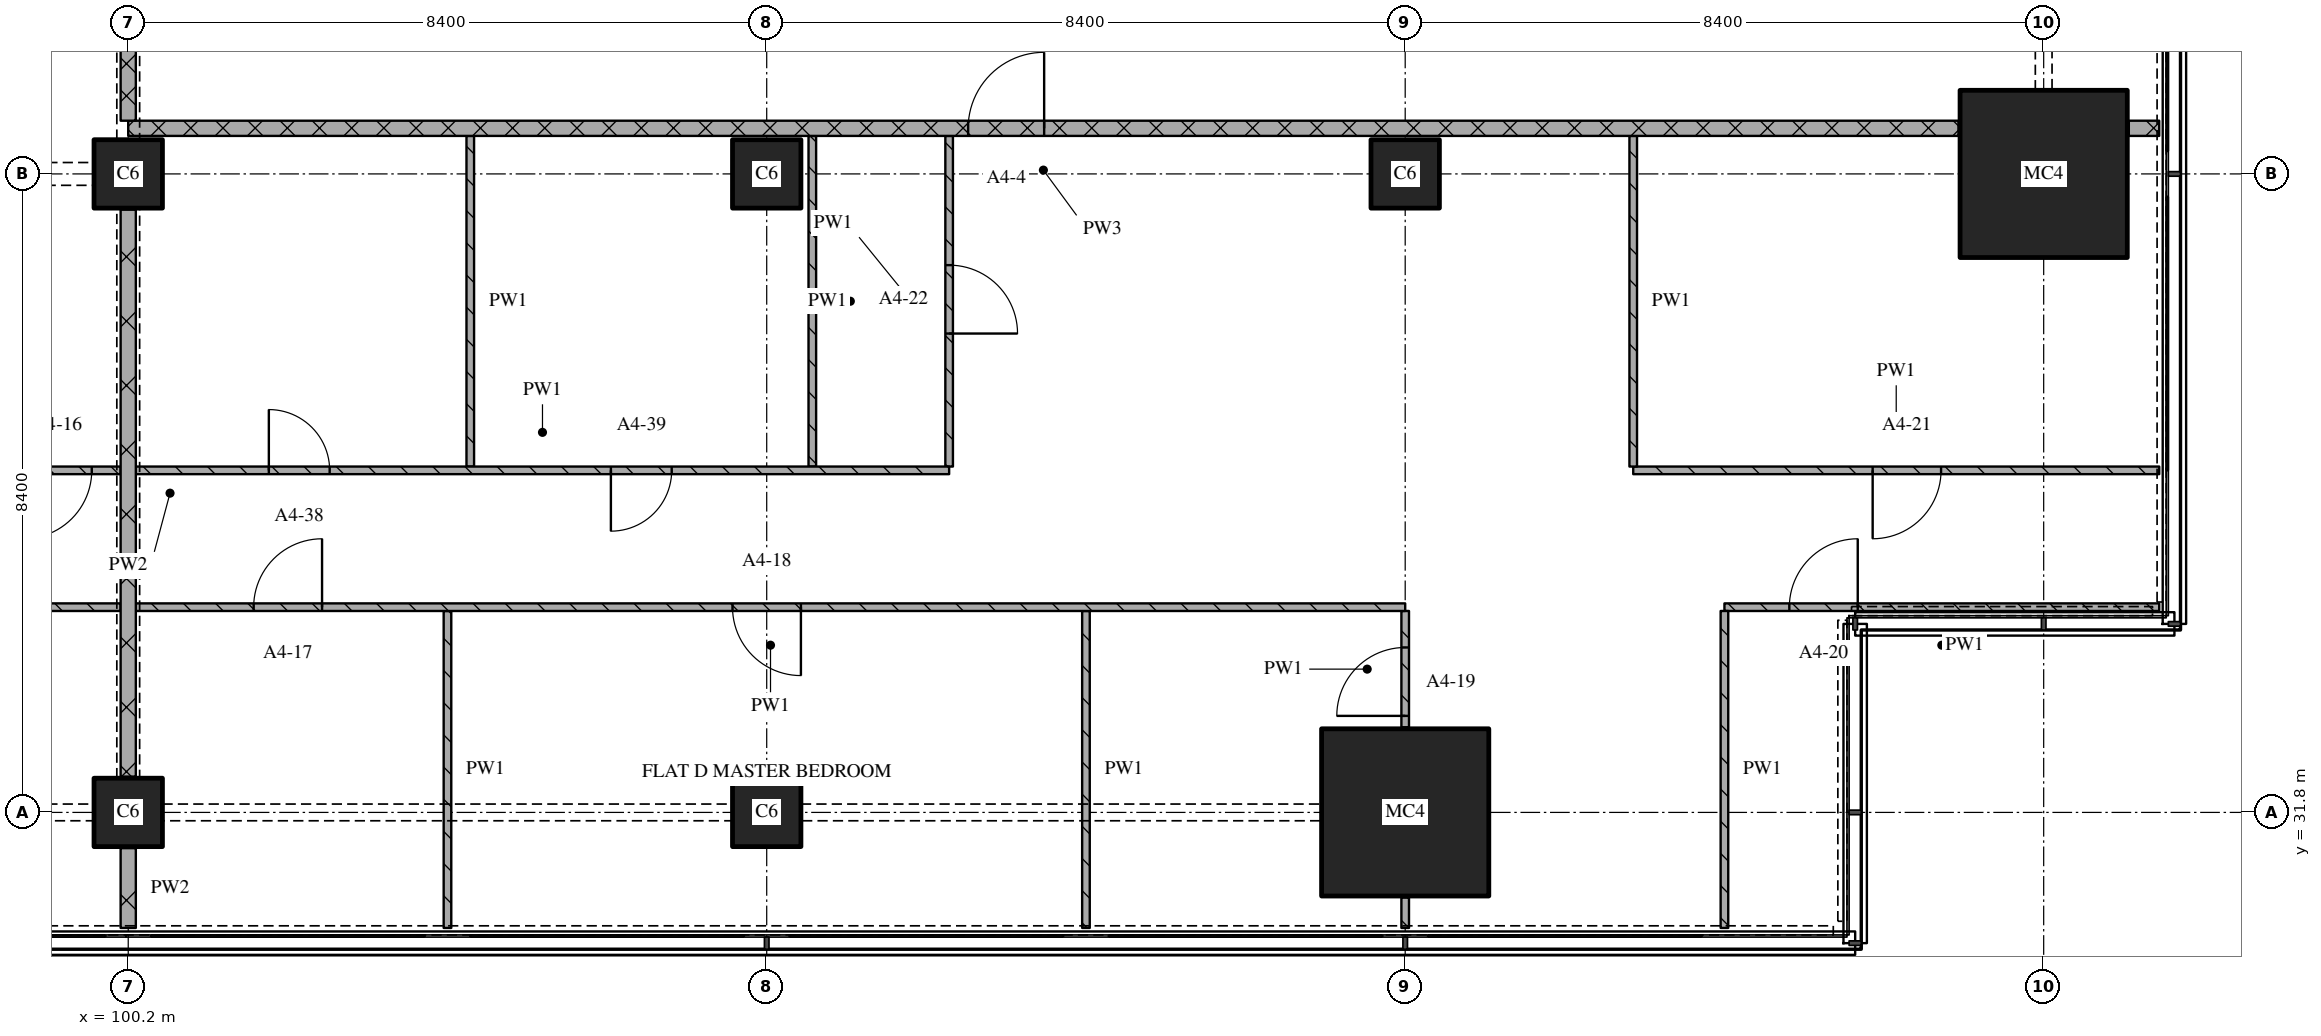
"""IFC4 building model, lengths in metres.
Left out: names, types, materials, properties, quantities, classifications, styles, units other than length and angle.
Written with IfcOpenShell. Run it as: python <this file> out.ifc"""

import sys

from ifc_helpers import new_model, si_unit, direction, frame, frame_2d, origin, origin_2d, place, context, subcontext, project, spatial, rectangle, extrude, element, fill, save


model = new_model("IFC4")
c1 = context("Model", 3, precision=1e-05, world=origin(), true_north=direction((0.0, 1.0)))
c2 = subcontext(c1, "Body", "Model", "MODEL_VIEW")
j1 = project(units=[si_unit("LENGTHUNIT", "METRE"), si_unit("PLANEANGLEUNIT", "RADIAN")], contexts=[c1])
p1 = place(None, origin())
s1 = spatial("IfcSite", under=j1, at=p1, CompositionType="ELEMENT")
p2 = place(p1, origin())
s2 = spatial("IfcBuilding", under=s1, at=p2, CompositionType="ELEMENT")
p3 = place(p2, frame((0.0, 0.0, 73.2)))
s3 = spatial("IfcBuildingStorey", under=s2, at=p3, CompositionType="ELEMENT", Elevation=73.2)
for number, where, z_axis, x_axis in (
    (1, (100.2, 31.8, 0.0), (0.0, 0.0, 1.0), (1.0, 0.0, 0.0)),
    (2, (100.2, 40.2, 0.0), (0.0, 0.0, 1.0), (1.0, 0.0, 0.0)),
    (3, (108.6, 31.8, 0.0), (0.0, 0.0, 1.0), (1.0, 0.0, 0.0)),
    (4, (108.6, 40.2, 0.0), (0.0, 0.0, 1.0), (1.0, 0.0, 0.0)),
):
    element("IfcColumn", number, at=place(p3, frame(where, z_axis=z_axis, x_axis=x_axis)), inside=s3, PredefinedType="COLUMN", context=c2, shape_type="SweptSolid", body=[
        extrude(rectangle(XDim=0.9, YDim=0.9, at=origin_2d()), origin(), (0.0, 0.0, 1.0), 3.6),
    ])
p4 = place(p3, frame((117.0, 31.8, 0.0), z_axis=(0.0, 0.0, 1.0), x_axis=(1.0, 0.0, 0.0)))
e5 = element("IfcColumn", 5, at=p4, inside=s3, PredefinedType="COLUMN", context=c2, shape_type="SweptSolid", body=[
    extrude(rectangle(XDim=2.2, YDim=2.2, at=origin_2d()), origin(), (0.0, 0.0, 1.0), 3.6),
])
p5 = place(p3, frame((117.0, 40.2, 0.0), z_axis=(0.0, 0.0, 1.0), x_axis=(1.0, 0.0, 0.0)))
e6 = element("IfcColumn", 6, at=p5, inside=s3, PredefinedType="COLUMN", context=c2, shape_type="SweptSolid", body=[
    extrude(rectangle(XDim=0.9, YDim=0.9, at=origin_2d()), origin(), (0.0, 0.0, 1.0), 3.6),
])
p6 = place(p3, frame((125.4, 40.2, 0.0), z_axis=(0.0, 0.0, 1.0), x_axis=(1.0, 0.0, 0.0)))
e7 = element("IfcColumn", 7, at=p6, inside=s3, PredefinedType="COLUMN", context=c2, shape_type="SweptSolid", body=[
    extrude(rectangle(XDim=2.2, YDim=2.2, at=origin_2d()), origin(), (0.0, 0.0, 1.0), 3.6),
])
p7 = place(p3, frame((126.92, 34.5, 0.0), z_axis=(0.0, 0.0, 1.0), x_axis=(-1.0, 0.0, 0.0)))
e8 = element("IfcWall", 8, at=p7, inside=s3, PredefinedType="PARTITIONING", context=c2, shape_type="SweptSolid", body=[
    extrude(rectangle(XDim=5.72, YDim=0.1, at=frame_2d((2.86, 0.0))), origin(), (0.0, 0.0, 1.0), 3.32),
])
p8 = place(p7, frame((3.966, 0.0, 0.0)))
e9 = element("IfcOpeningElement", 9, at=p8, cuts=e8, PredefinedType="OPENING", context=c2, shape_type="SweptSolid", body=[
    extrude(rectangle(XDim=0.9, YDim=2.1, at=frame_2d((0.45, 1.05))), frame((0.0, 0.06, 0.0), z_axis=(0.0, -1.0, 0.0), x_axis=(1.0, 0.0, 0.0)), (0.0, 0.0, 1.0), 0.12),
])
p9 = place(p3, frame((120.0, 36.3, 0.0), z_axis=(0.0, 0.0, 1.0), x_axis=(1.0, 0.0, 0.0)))
e10 = element("IfcWall", 10, at=p9, inside=s3, PredefinedType="PARTITIONING", context=c2, shape_type="SweptSolid", body=[
    extrude(rectangle(XDim=6.92, YDim=0.1, at=frame_2d((3.46, 0.0))), origin(), (0.0, 0.0, 1.0), 3.32),
])
p10 = place(p9, frame((3.15, 0.0, 0.0)))
e11 = element("IfcOpeningElement", 11, at=p10, cuts=e10, PredefinedType="OPENING", context=c2, shape_type="SweptSolid", body=[
    extrude(rectangle(XDim=0.9, YDim=2.1, at=frame_2d((0.45, 1.05))), frame((0.0, 0.06, 0.0), z_axis=(0.0, -1.0, 0.0), x_axis=(1.0, 0.0, 0.0)), (0.0, 0.0, 1.0), 0.12),
])
p11 = place(p3, frame((124.28, 40.8, 0.0), z_axis=(0.0, 0.0, 1.0), x_axis=(-1.0, 0.0, 0.0)))
e12 = element("IfcWall", 12, at=p11, inside=s3, PredefinedType="PARTITIONING", context=c2, shape_type="SweptSolid", body=[
    extrude(rectangle(XDim=24.08, YDim=0.2, at=frame_2d((12.04, 0.0))), origin(), (0.0, 0.0, 1.0), 3.32),
])
p12 = place(p11, frame((12.03, 0.0, 0.0)))
e13 = element("IfcOpeningElement", 13, at=p12, cuts=e12, PredefinedType="OPENING", context=c2, shape_type="SweptSolid", body=[
    extrude(rectangle(XDim=1.0, YDim=2.1, at=frame_2d((0.5, 1.05))), frame((0.0, 0.11, 0.0), z_axis=(0.0, -1.0, 0.0), x_axis=(1.0, 0.0, 0.0)), (0.0, 0.0, 1.0), 0.22),
])
p13 = place(p3, frame((126.52, 40.8, 0.0), z_axis=(0.0, 0.0, 1.0), x_axis=(1.0, 0.0, 0.0)))
e14 = element("IfcWall", 14, at=p13, inside=s3, PredefinedType="PARTITIONING", context=c2, shape_type="SweptSolid", body=[
    extrude(rectangle(XDim=0.4, YDim=0.2, at=frame_2d((0.2, 0.0))), origin(), (0.0, 0.0, 1.0), 3.32),
])
p14 = place(p3, frame((100.2, 43.1, 0.0), z_axis=(0.0, 0.0, 1.0), x_axis=(0.0, -1.0, 0.0)))
e15 = element("IfcWall", 15, at=p14, inside=s3, PredefinedType="PARTITIONING", context=c2, shape_type="SweptSolid", body=[
    extrude(rectangle(XDim=2.2, YDim=0.2, at=frame_2d((1.1, 0.0))), origin(), (0.0, 0.0, 1.0), 2.43),
])
p15 = place(p3, frame((100.2, 31.33, 0.0), z_axis=(0.0, 0.0, 1.0), x_axis=(0.0, -1.0, 0.0)))
e16 = element("IfcWall", 16, at=p15, inside=s3, PredefinedType="PARTITIONING", context=c2, shape_type="SweptSolid", body=[
    extrude(rectangle(XDim=1.05, YDim=0.2, at=frame_2d((0.525, 0.0))), origin(), (0.0, 0.0, 1.0), 3.32),
])
p16 = place(p3, frame((100.2, 39.73, 0.0), z_axis=(0.0, 0.0, 1.0), x_axis=(0.0, -1.0, 0.0)))
e17 = element("IfcWall", 17, at=p16, inside=s3, PredefinedType="PARTITIONING", context=c2, shape_type="SweptSolid", body=[
    extrude(rectangle(XDim=7.46, YDim=0.2, at=frame_2d((3.73, 0.0))), origin(), (0.0, 0.0, 1.0), 2.83),
])
p17 = place(p3, frame((104.4, 34.45, 0.0), z_axis=(0.0, 0.0, 1.0), x_axis=(0.0, -1.0, 0.0)))
e18 = element("IfcWall", 18, at=p17, inside=s3, PredefinedType="PARTITIONING", context=c2, shape_type="SweptSolid", body=[
    extrude(rectangle(XDim=4.17, YDim=0.1, at=frame_2d((2.085, 0.0))), origin(), (0.0, 0.0, 1.0), 3.32),
])
for number, where, z_axis, x_axis in (
    (19, (104.7, 40.7, 0.0), (0.0, 0.0, 1.0), (0.0, -1.0, 0.0)),
    (20, (109.2, 40.7, 0.0), (0.0, 0.0, 1.0), (0.0, -1.0, 0.0)),
):
    element("IfcWall", number, at=place(p3, frame(where, z_axis=z_axis, x_axis=x_axis)), inside=s3, PredefinedType="PARTITIONING", context=c2, shape_type="SweptSolid", body=[
        extrude(rectangle(XDim=4.35, YDim=0.1, at=frame_2d((2.175, 0.0))), origin(), (0.0, 0.0, 1.0), 3.32),
    ])
p18 = place(p3, frame((111.0, 36.35, 0.0), z_axis=(0.0, 0.0, 1.0), x_axis=(0.0, 1.0, 0.0)))
e21 = element("IfcWall", 21, at=p18, inside=s3, PredefinedType="PARTITIONING", context=c2, shape_type="SweptSolid", body=[
    extrude(rectangle(XDim=4.35, YDim=0.1, at=frame_2d((2.175, 0.0))), origin(), (0.0, 0.0, 1.0), 3.32),
])
p19 = place(p18, frame((1.75, 0.0, 0.0)))
e22 = element("IfcOpeningElement", 22, at=p19, cuts=e21, PredefinedType="OPENING", context=c2, shape_type="SweptSolid", body=[
    extrude(rectangle(XDim=0.9, YDim=2.1, at=frame_2d((0.45, 1.05))), frame((0.0, 0.06, 0.0), z_axis=(0.0, -1.0, 0.0), x_axis=(1.0, 0.0, 0.0)), (0.0, 0.0, 1.0), 0.12),
])
p20 = place(p3, frame((112.8, 34.45, 0.0), z_axis=(0.0, 0.0, 1.0), x_axis=(0.0, -1.0, 0.0)))
e23 = element("IfcWall", 23, at=p20, inside=s3, PredefinedType="PARTITIONING", context=c2, shape_type="SweptSolid", body=[
    extrude(rectangle(XDim=4.17, YDim=0.1, at=frame_2d((2.085, 0.0))), origin(), (0.0, 0.0, 1.0), 3.32),
])
p21 = place(p3, frame((117.0, 30.68, 0.0), z_axis=(0.0, 0.0, 1.0), x_axis=(0.0, -1.0, 0.0)))
e24 = element("IfcWall", 24, at=p21, inside=s3, PredefinedType="PARTITIONING", context=c2, shape_type="SweptSolid", body=[
    extrude(rectangle(XDim=0.4, YDim=0.1, at=frame_2d((0.2, 0.0))), origin(), (0.0, 0.0, 1.0), 3.32),
])
p22 = place(p3, frame((117.0, 32.92, 0.0), z_axis=(0.0, 0.0, 1.0), x_axis=(0.0, 1.0, 0.0)))
e25 = element("IfcWall", 25, at=p22, inside=s3, PredefinedType="PARTITIONING", context=c2, shape_type="SweptSolid", body=[
    extrude(rectangle(XDim=1.53, YDim=0.1, at=frame_2d((0.765, 0.0))), origin(), (0.0, 0.0, 1.0), 3.32),
])
p23 = place(p22, frame((0.15, 0.0, 0.0)))
e26 = element("IfcOpeningElement", 26, at=p23, cuts=e25, PredefinedType="OPENING", context=c2, shape_type="SweptSolid", body=[
    extrude(rectangle(XDim=0.9, YDim=2.1, at=frame_2d((0.45, 1.05))), frame((0.0, 0.06, 0.0), z_axis=(0.0, -1.0, 0.0), x_axis=(1.0, 0.0, 0.0)), (0.0, 0.0, 1.0), 0.12),
])
p24 = place(p3, frame((120.0, 40.7, 0.0), z_axis=(0.0, 0.0, 1.0), x_axis=(0.0, -1.0, 0.0)))
e27 = element("IfcWall", 27, at=p24, inside=s3, PredefinedType="PARTITIONING", context=c2, shape_type="SweptSolid", body=[
    extrude(rectangle(XDim=4.35, YDim=0.1, at=frame_2d((2.175, 0.0))), origin(), (0.0, 0.0, 1.0), 3.32),
])
p25 = place(p3, frame((121.2, 34.45, 0.0), z_axis=(0.0, 0.0, 1.0), x_axis=(0.0, -1.0, 0.0)))
e28 = element("IfcWall", 28, at=p25, inside=s3, PredefinedType="PARTITIONING", context=c2, shape_type="SweptSolid", body=[
    extrude(rectangle(XDim=4.17, YDim=0.1, at=frame_2d((2.085, 0.0))), origin(), (0.0, 0.0, 1.0), 3.32),
])
p26 = place(p3, frame((100.1, 34.5, 0.0), z_axis=(0.0, 0.0, 1.0), x_axis=(-1.0, 0.0, 0.0)))
e29 = element("IfcWall", 29, at=p26, inside=s3, PredefinedType="PARTITIONING", context=c2, shape_type="SweptSolid", body=[
    extrude(rectangle(XDim=8.3, YDim=0.1, at=frame_2d((4.15, 0.0))), origin(), (0.0, 0.0, 1.0), 3.32),
])
p27 = place(p26, frame((3.65, 0.0, 0.0)))
e30 = element("IfcOpeningElement", 30, at=p27, cuts=e29, PredefinedType="OPENING", context=c2, shape_type="SweptSolid", body=[
    extrude(rectangle(XDim=0.9, YDim=2.1, at=frame_2d((0.45, 1.05))), frame((0.0, 0.06, 0.0), z_axis=(0.0, -1.0, 0.0), x_axis=(1.0, 0.0, 0.0)), (0.0, 0.0, 1.0), 0.12),
])
p28 = place(p3, frame((117.0, 34.5, 0.0), z_axis=(0.0, 0.0, 1.0), x_axis=(-1.0, 0.0, 0.0)))
e31 = element("IfcWall", 31, at=p28, inside=s3, PredefinedType="PARTITIONING", context=c2, shape_type="SweptSolid", body=[
    extrude(rectangle(XDim=16.7, YDim=0.1, at=frame_2d((8.35, 0.0))), origin(), (0.0, 0.0, 1.0), 3.32),
])
p29 = place(p28, frame((7.95, 0.0, 0.0)))
e32 = element("IfcOpeningElement", 32, at=p29, cuts=e31, PredefinedType="OPENING", context=c2, shape_type="SweptSolid", body=[
    extrude(rectangle(XDim=0.9, YDim=2.1, at=frame_2d((0.45, 1.05))), frame((0.0, 0.06, 0.0), z_axis=(0.0, -1.0, 0.0), x_axis=(1.0, 0.0, 0.0)), (0.0, 0.0, 1.0), 0.12),
])
p30 = place(p28, frame((14.25, 0.0, 0.0)))
e33 = element("IfcOpeningElement", 33, at=p30, cuts=e31, PredefinedType="OPENING", context=c2, shape_type="SweptSolid", body=[
    extrude(rectangle(XDim=0.9, YDim=2.1, at=frame_2d((0.45, 1.05))), frame((0.0, 0.06, 0.0), z_axis=(0.0, -1.0, 0.0), x_axis=(1.0, 0.0, 0.0)), (0.0, 0.0, 1.0), 0.12),
])
p31 = place(p3, frame((94.5, 36.3, 0.0), z_axis=(0.0, 0.0, 1.0), x_axis=(1.0, 0.0, 0.0)))
e34 = element("IfcWall", 34, at=p31, inside=s3, PredefinedType="PARTITIONING", context=c2, shape_type="SweptSolid", body=[
    extrude(rectangle(XDim=5.6, YDim=0.1, at=frame_2d((2.8, 0.0))), origin(), (0.0, 0.0, 1.0), 3.32),
])
p32 = place(p31, frame((4.32, 0.0, 0.0)))
e35 = element("IfcOpeningElement", 35, at=p32, cuts=e34, PredefinedType="OPENING", context=c2, shape_type="SweptSolid", body=[
    extrude(rectangle(XDim=0.9, YDim=2.1, at=frame_2d((0.45, 1.05))), frame((0.0, 0.06, 0.0), z_axis=(0.0, -1.0, 0.0), x_axis=(1.0, 0.0, 0.0)), (0.0, 0.0, 1.0), 0.12),
])
p33 = place(p3, frame((100.3, 36.3, 0.0), z_axis=(0.0, 0.0, 1.0), x_axis=(1.0, 0.0, 0.0)))
e36 = element("IfcWall", 36, at=p33, inside=s3, PredefinedType="PARTITIONING", context=c2, shape_type="SweptSolid", body=[
    extrude(rectangle(XDim=10.7, YDim=0.1, at=frame_2d((5.35, 0.0))), origin(), (0.0, 0.0, 1.0), 3.32),
])
p34 = place(p33, frame((1.75, 0.0, 0.0)))
e37 = element("IfcOpeningElement", 37, at=p34, cuts=e36, PredefinedType="OPENING", context=c2, shape_type="SweptSolid", body=[
    extrude(rectangle(XDim=0.8, YDim=2.1, at=frame_2d((0.4, 1.05))), frame((0.0, 0.06, 0.0), z_axis=(0.0, -1.0, 0.0), x_axis=(1.0, 0.0, 0.0)), (0.0, 0.0, 1.0), 0.12),
])
p35 = place(p33, frame((6.25, 0.0, 0.0)))
e38 = element("IfcOpeningElement", 38, at=p35, cuts=e36, PredefinedType="OPENING", context=c2, shape_type="SweptSolid", body=[
    extrude(rectangle(XDim=0.8, YDim=2.1, at=frame_2d((0.4, 1.05))), frame((0.0, 0.06, 0.0), z_axis=(0.0, -1.0, 0.0), x_axis=(1.0, 0.0, 0.0)), (0.0, 0.0, 1.0), 0.12),
])
p36 = place(p8, origin())
e39 = element("IfcDoor", 39, at=p36, inside=s3, OperationType="SINGLE_SWING_RIGHT", PredefinedType="DOOR", context=c2, shape_type="SweptSolid", body=[
    extrude(rectangle(XDim=0.9, YDim=2.1, at=frame_2d((0.45, 1.05))), frame((0.0, 0.025, 0.0), z_axis=(0.0, -1.0, 0.0), x_axis=(1.0, 0.0, 0.0)), (0.0, 0.0, 1.0), 0.05),
])
fill(e9, e39)
p37 = place(p10, origin())
e40 = element("IfcDoor", 40, at=p37, inside=s3, OperationType="SINGLE_SWING_RIGHT", PredefinedType="DOOR", context=c2, shape_type="SweptSolid", body=[
    extrude(rectangle(XDim=0.9, YDim=2.1, at=frame_2d((0.45, 1.05))), frame((0.0, 0.025, 0.0), z_axis=(0.0, -1.0, 0.0), x_axis=(1.0, 0.0, 0.0)), (0.0, 0.0, 1.0), 0.05),
])
fill(e11, e40)
p38 = place(p12, origin())
e41 = element("IfcDoor", 41, at=p38, inside=s3, OperationType="SINGLE_SWING_RIGHT", PredefinedType="DOOR", context=c2, shape_type="SweptSolid", body=[
    extrude(rectangle(XDim=1.0, YDim=2.1, at=frame_2d((0.5, 1.05))), frame((0.0, 0.025, 0.0), z_axis=(0.0, -1.0, 0.0), x_axis=(1.0, 0.0, 0.0)), (0.0, 0.0, 1.0), 0.05),
])
fill(e13, e41)
p39 = place(p19, origin())
e42 = element("IfcDoor", 42, at=p39, inside=s3, OperationType="SINGLE_SWING_RIGHT", PredefinedType="DOOR", context=c2, shape_type="SweptSolid", body=[
    extrude(rectangle(XDim=0.9, YDim=2.1, at=frame_2d((0.45, 1.05))), frame((0.0, 0.025, 0.0), z_axis=(0.0, -1.0, 0.0), x_axis=(1.0, 0.0, 0.0)), (0.0, 0.0, 1.0), 0.05),
])
fill(e22, e42)
p40 = place(p23, origin())
e43 = element("IfcDoor", 43, at=p40, inside=s3, OperationType="SINGLE_SWING_LEFT", PredefinedType="DOOR", context=c2, shape_type="SweptSolid", body=[
    extrude(rectangle(XDim=0.9, YDim=2.1, at=frame_2d((0.45, 1.05))), frame((0.0, 0.025, 0.0), z_axis=(0.0, -1.0, 0.0), x_axis=(1.0, 0.0, 0.0)), (0.0, 0.0, 1.0), 0.05),
])
fill(e26, e43)
p41 = place(p29, origin())
e44 = element("IfcDoor", 44, at=p41, inside=s3, OperationType="SINGLE_SWING_LEFT", PredefinedType="DOOR", context=c2, shape_type="SweptSolid", body=[
    extrude(rectangle(XDim=0.9, YDim=2.1, at=frame_2d((0.45, 1.05))), frame((0.0, 0.025, 0.0), z_axis=(0.0, -1.0, 0.0), x_axis=(1.0, 0.0, 0.0)), (0.0, 0.0, 1.0), 0.05),
])
fill(e32, e44)
p42 = place(p30, origin())
e45 = element("IfcDoor", 45, at=p42, inside=s3, OperationType="SINGLE_SWING_RIGHT", PredefinedType="DOOR", context=c2, shape_type="SweptSolid", body=[
    extrude(rectangle(XDim=0.9, YDim=2.1, at=frame_2d((0.45, 1.05))), frame((0.0, 0.025, 0.0), z_axis=(0.0, -1.0, 0.0), x_axis=(1.0, 0.0, 0.0)), (0.0, 0.0, 1.0), 0.05),
])
fill(e33, e45)
p43 = place(p32, origin())
e46 = element("IfcDoor", 46, at=p43, inside=s3, OperationType="SINGLE_SWING_RIGHT", PredefinedType="DOOR", context=c2, shape_type="SweptSolid", body=[
    extrude(rectangle(XDim=0.9, YDim=2.1, at=frame_2d((0.45, 1.05))), frame((0.0, 0.025, 0.0), z_axis=(0.0, -1.0, 0.0), x_axis=(1.0, 0.0, 0.0)), (0.0, 0.0, 1.0), 0.05),
])
fill(e35, e46)
p44 = place(p34, origin())
e47 = element("IfcDoor", 47, at=p44, inside=s3, OperationType="SINGLE_SWING_LEFT", PredefinedType="DOOR", context=c2, shape_type="SweptSolid", body=[
    extrude(rectangle(XDim=0.8, YDim=2.1, at=frame_2d((0.4, 1.05))), frame((0.0, 0.025, 0.0), z_axis=(0.0, -1.0, 0.0), x_axis=(1.0, 0.0, 0.0)), (0.0, 0.0, 1.0), 0.05),
])
fill(e37, e47)
p45 = place(p35, origin())
e48 = element("IfcDoor", 48, at=p45, inside=s3, OperationType="SINGLE_SWING_RIGHT", PredefinedType="DOOR", context=c2, shape_type="SweptSolid", body=[
    extrude(rectangle(XDim=0.8, YDim=2.1, at=frame_2d((0.4, 1.05))), frame((0.0, 0.025, 0.0), z_axis=(0.0, -1.0, 0.0), x_axis=(1.0, 0.0, 0.0)), (0.0, 0.0, 1.0), 0.05),
])
fill(e38, e48)
save(model, sys.argv[1])
